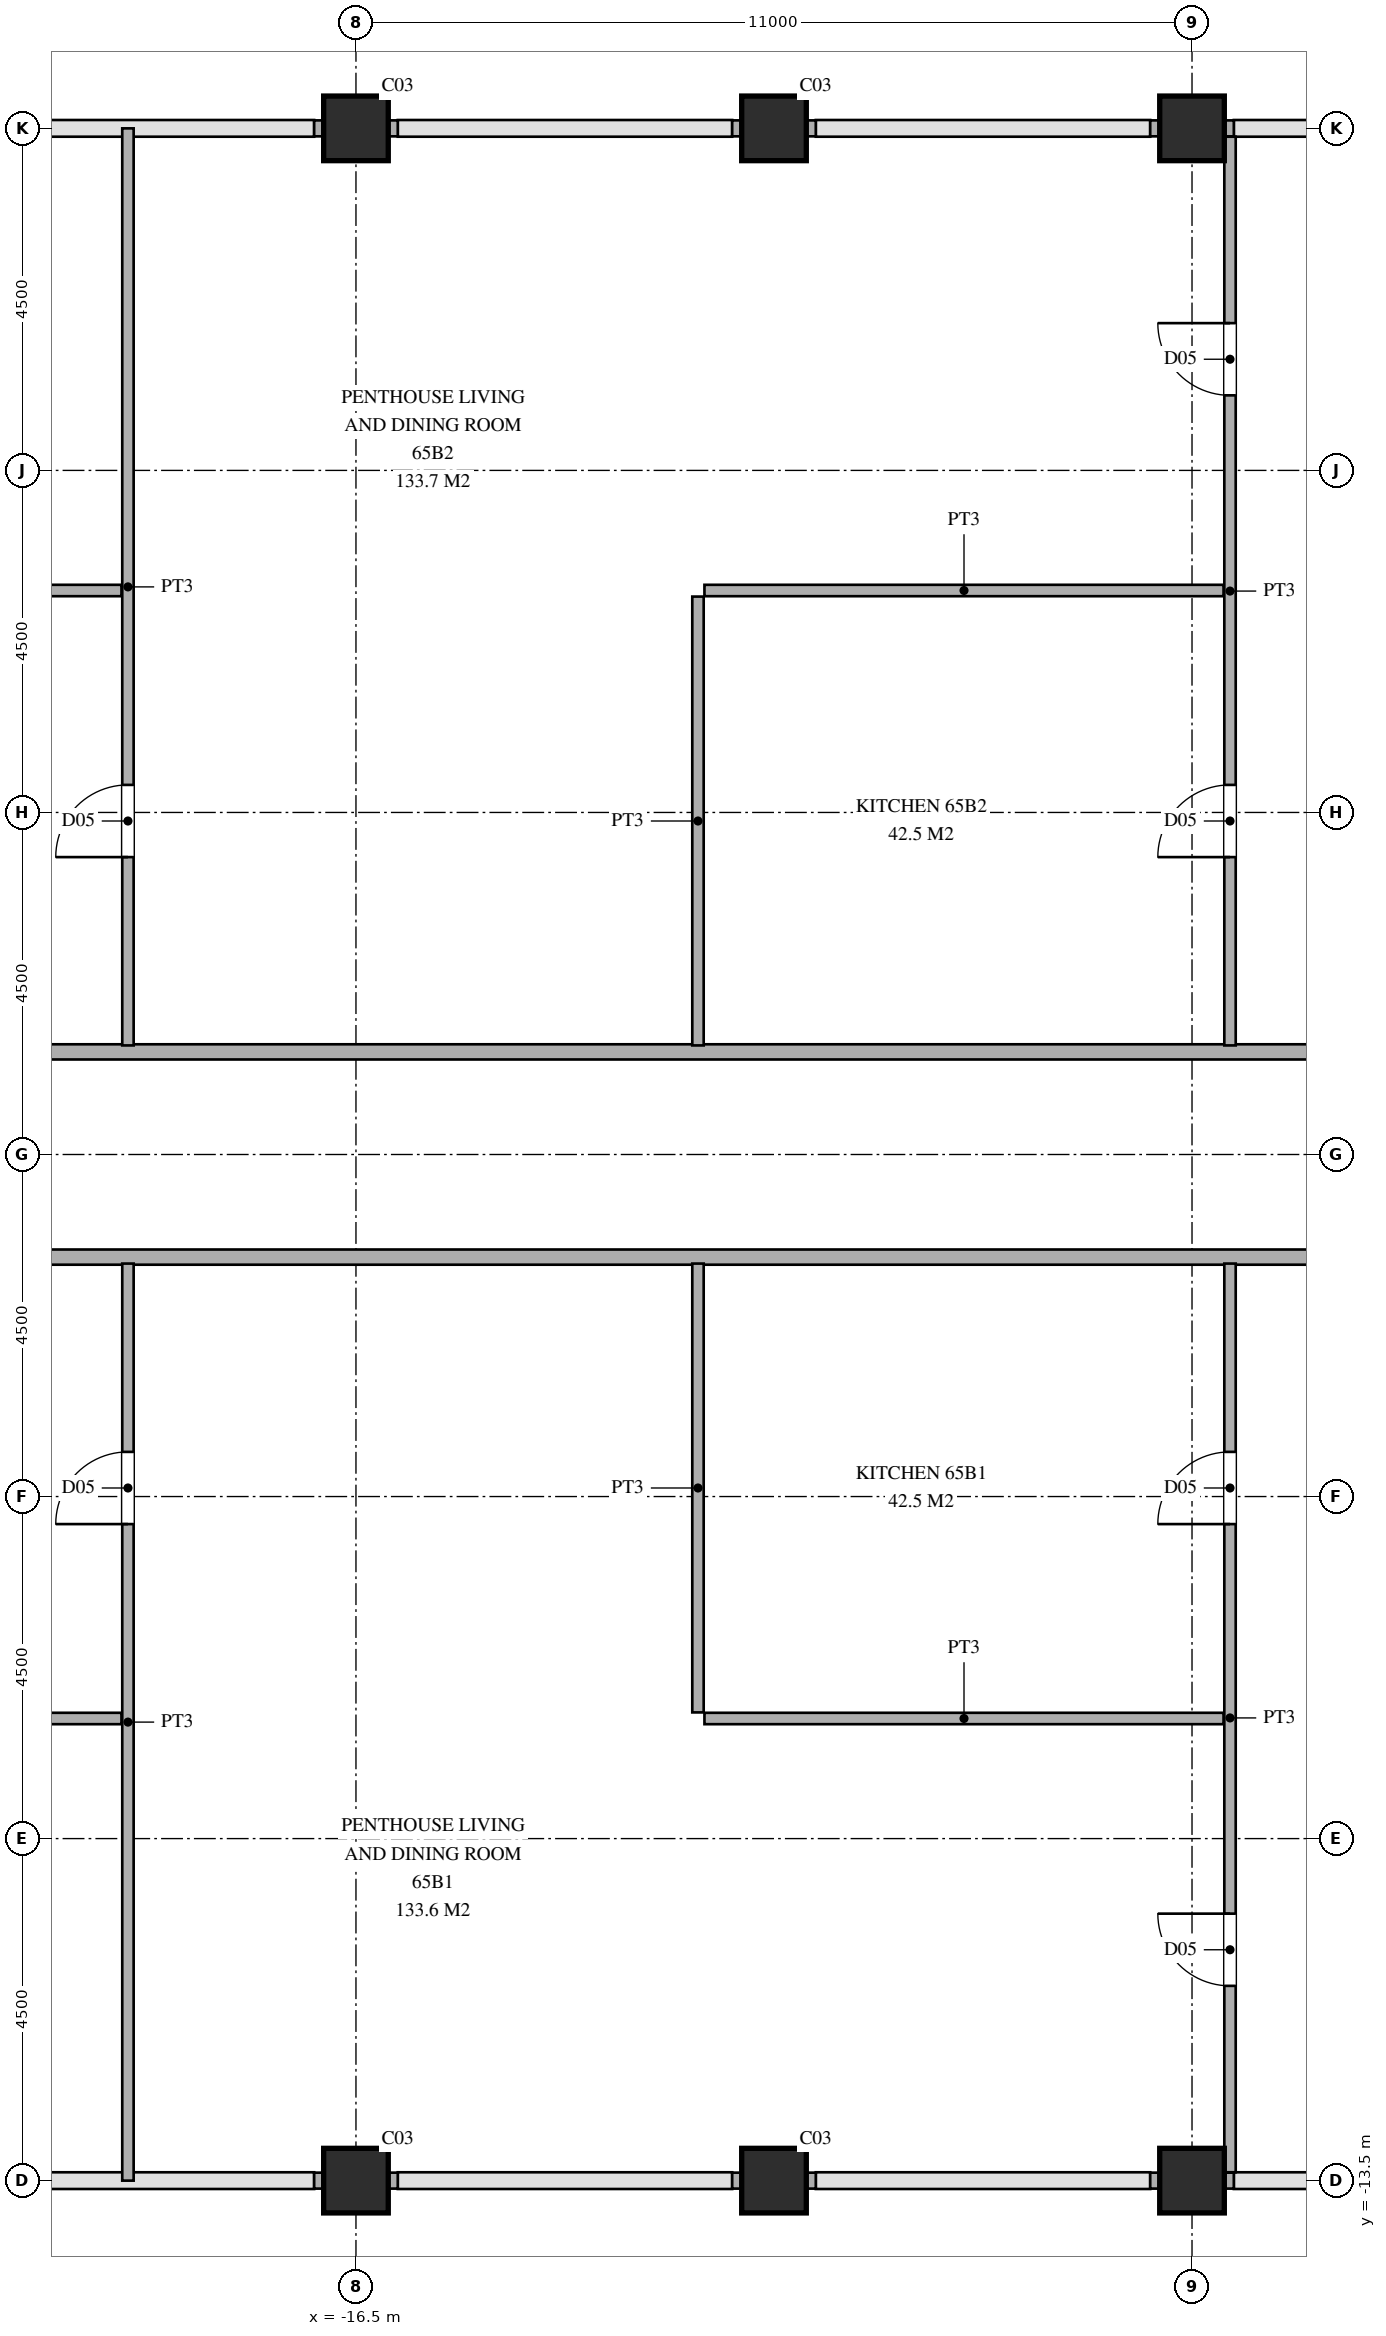
"""IFC4 building model, lengths in metres.
Left out: names, types, materials, properties, quantities, classifications, styles, units other than length and angle.
Written with IfcOpenShell. Run it as: python <this file> out.ifc"""

import sys

from ifc_helpers import new_model, si_unit, direction, frame, frame_2d, origin, origin_2d, place, context, subcontext, project, spatial, rectangle, hollow_rectangle, extrude, source, transform, mapped, element, fill, save


model = new_model("IFC4")
c1 = context("Model", 3, precision=1e-05, world=origin(), true_north=direction((0.0, 1.0)))
c2 = subcontext(c1, "Body", "Model", "MODEL_VIEW")
j1 = project(units=[si_unit("LENGTHUNIT", "METRE"), si_unit("PLANEANGLEUNIT", "RADIAN")], contexts=[c1])
p1 = place(None, origin())
s1 = spatial("IfcSite", under=j1, at=p1, CompositionType="ELEMENT")
p2 = place(p1, origin())
s2 = spatial("IfcBuilding", under=s1, at=p2, CompositionType="ELEMENT")
p3 = place(p2, frame((0.0, 0.0, 246.9)))
s3 = spatial("IfcBuildingStorey", under=s2, at=p3, CompositionType="ELEMENT", Elevation=246.9)
m1 = source(origin(), c2, "Body", "SweptSolid", [
    extrude(hollow_rectangle(XDim=0.85, YDim=0.85, WallThickness=0.036, at=origin_2d()), origin(), (0.0, 0.0, 1.0), 3.75),
])
for number, where, z_axis, x_axis in (
    (1, (-16.5, -13.5, 0.0), (0.0, 0.0, 1.0), (1.0, 0.0, 0.0)),
    (2, (-16.5, 13.5, 0.0), (0.0, 0.0, 1.0), (1.0, 0.0, 0.0)),
    (3, (-11.0, -13.5, 0.0), (0.0, 0.0, 1.0), (1.0, 0.0, 0.0)),
    (4, (-11.0, 13.5, 0.0), (0.0, 0.0, 1.0), (1.0, 0.0, 0.0)),
    (5, (-5.5, -13.5, 0.0), (0.0, 0.0, 1.0), (1.0, 0.0, 0.0)),
    (6, (-5.5, 13.5, 0.0), (0.0, 0.0, 1.0), (1.0, 0.0, 0.0)),
):
    element("IfcColumn", number, at=place(p3, frame(where, z_axis=z_axis, x_axis=x_axis)), inside=s3, PredefinedType="COLUMN", context=c2, shape_type="MappedRepresentation", body=[
        mapped(m1, transform((0.0, 0.0, 0.0), scale=1.0)),
    ])
for number, where, z_axis, x_axis in (
    (7, (-17.05, -13.5, 0.0), (0.0, 0.0, 1.0), (1.0, 0.0, 0.0)),
    (8, (-17.05, 13.5, 0.0), (0.0, 0.0, 1.0), (1.0, 0.0, 0.0)),
    (9, (-11.55, -13.5, 0.0), (0.0, 0.0, 1.0), (1.0, 0.0, 0.0)),
    (10, (-11.55, 13.5, 0.0), (0.0, 0.0, 1.0), (1.0, 0.0, 0.0)),
    (11, (-6.05, -13.5, 0.0), (0.0, 0.0, 1.0), (1.0, 0.0, 0.0)),
    (12, (-6.05, 13.5, 0.0), (0.0, 0.0, 1.0), (1.0, 0.0, 0.0)),
):
    element("IfcWall", number, at=place(p3, frame(where, z_axis=z_axis, x_axis=x_axis)), inside=s3, PredefinedType="SOLIDWALL", context=c2, shape_type="SweptSolid", body=[
        extrude(rectangle(XDim=1.1, YDim=0.21, at=frame_2d((0.55, 0.0))), origin(), (0.0, 0.0, 1.0), 3.03),
    ])
p4 = place(p3, frame((-27.245, -7.42, 0.0), z_axis=(0.0, 0.0, 1.0), x_axis=(1.0, 0.0, 0.0)))
e13 = element("IfcWall", 13, at=p4, inside=s3, PredefinedType="PARTITIONING", context=c2, shape_type="SweptSolid", body=[
    extrude(rectangle(XDim=7.66, YDim=0.15, at=frame_2d((3.83, 0.0))), origin(), (0.0, 0.0, 1.0), 3.53),
])
p5 = place(p4, frame((3.57, 0.0, 0.0)))
e14 = element("IfcOpeningElement", 14, at=p5, cuts=e13, PredefinedType="OPENING", context=c2, shape_type="SweptSolid", body=[
    extrude(rectangle(XDim=0.95, YDim=2.15, at=frame_2d((0.475, 1.075))), frame((0.0, 0.085, 0.0), z_axis=(0.0, -1.0, 0.0), x_axis=(1.0, 0.0, 0.0)), (0.0, 0.0, 1.0), 0.17),
])
p6 = place(p3, frame((-11.915, -7.42, 0.0), z_axis=(0.0, 0.0, 1.0), x_axis=(1.0, 0.0, 0.0)))
e15 = element("IfcWall", 15, at=p6, inside=s3, PredefinedType="PARTITIONING", context=c2, shape_type="SweptSolid", body=[
    extrude(rectangle(XDim=6.83, YDim=0.15, at=frame_2d((3.415, 0.0))), origin(), (0.0, 0.0, 1.0), 3.53),
])
p7 = place(p3, frame((-27.245, -1.35, 0.0), z_axis=(0.0, 0.0, 1.0), x_axis=(1.0, 0.0, 0.0)))
e16 = element("IfcWall", 16, at=p7, inside=s3, PredefinedType="PARTITIONING", context=c2, shape_type="SweptSolid", body=[
    extrude(rectangle(XDim=54.49, YDim=0.2, at=frame_2d((27.245, 0.0))), origin(), (0.0, 0.0, 1.0), 3.53),
])
p8 = place(p7, frame((24.97, 0.0, 0.0)))
e17 = element("IfcOpeningElement", 17, at=p8, cuts=e16, PredefinedType="OPENING", context=c2, shape_type="SweptSolid", body=[
    extrude(rectangle(XDim=1.05, YDim=2.25, at=frame_2d((0.525, 1.125))), frame((0.0, 0.11, 0.0), z_axis=(0.0, -1.0, 0.0), x_axis=(1.0, 0.0, 0.0)), (0.0, 0.0, 1.0), 0.22),
])
p9 = place(p3, frame((-27.245, 1.35, 0.0), z_axis=(0.0, 0.0, 1.0), x_axis=(1.0, 0.0, 0.0)))
e18 = element("IfcWall", 18, at=p9, inside=s3, PredefinedType="PARTITIONING", context=c2, shape_type="SweptSolid", body=[
    extrude(rectangle(XDim=54.49, YDim=0.2, at=frame_2d((27.245, 0.0))), origin(), (0.0, 0.0, 1.0), 3.53),
])
p10 = place(p9, frame((24.97, 0.0, 0.0)))
e19 = element("IfcOpeningElement", 19, at=p10, cuts=e18, PredefinedType="OPENING", context=c2, shape_type="SweptSolid", body=[
    extrude(rectangle(XDim=1.05, YDim=2.25, at=frame_2d((0.525, 1.125))), frame((0.0, 0.11, 0.0), z_axis=(0.0, -1.0, 0.0), x_axis=(1.0, 0.0, 0.0)), (0.0, 0.0, 1.0), 0.22),
])
p11 = place(p3, frame((-27.245, 7.42, 0.0), z_axis=(0.0, 0.0, 1.0), x_axis=(1.0, 0.0, 0.0)))
e20 = element("IfcWall", 20, at=p11, inside=s3, PredefinedType="PARTITIONING", context=c2, shape_type="SweptSolid", body=[
    extrude(rectangle(XDim=7.66, YDim=0.15, at=frame_2d((3.83, 0.0))), origin(), (0.0, 0.0, 1.0), 3.53),
])
p12 = place(p11, frame((3.57, 0.0, 0.0)))
e21 = element("IfcOpeningElement", 21, at=p12, cuts=e20, PredefinedType="OPENING", context=c2, shape_type="SweptSolid", body=[
    extrude(rectangle(XDim=0.95, YDim=2.15, at=frame_2d((0.475, 1.075))), frame((0.0, 0.085, 0.0), z_axis=(0.0, -1.0, 0.0), x_axis=(1.0, 0.0, 0.0)), (0.0, 0.0, 1.0), 0.17),
])
p13 = place(p3, frame((-11.915, 7.42, 0.0), z_axis=(0.0, 0.0, 1.0), x_axis=(1.0, 0.0, 0.0)))
e22 = element("IfcWall", 22, at=p13, inside=s3, PredefinedType="PARTITIONING", context=c2, shape_type="SweptSolid", body=[
    extrude(rectangle(XDim=6.83, YDim=0.15, at=frame_2d((3.415, 0.0))), origin(), (0.0, 0.0, 1.0), 3.53),
])
p14 = place(p3, frame((-19.5, -13.5, 0.0), z_axis=(0.0, 0.0, 1.0), x_axis=(0.0, 1.0, 0.0)))
e23 = element("IfcWall", 23, at=p14, inside=s3, PredefinedType="PARTITIONING", context=c2, shape_type="SweptSolid", body=[
    extrude(rectangle(XDim=12.065, YDim=0.15, at=frame_2d((6.032, 0.0))), origin(), (0.0, 0.0, 1.0), 3.53),
])
p15 = place(p14, frame((8.637, 0.0, 0.0)))
e24 = element("IfcOpeningElement", 24, at=p15, cuts=e23, PredefinedType="OPENING", context=c2, shape_type="SweptSolid", body=[
    extrude(rectangle(XDim=0.95, YDim=2.15, at=frame_2d((0.475, 1.075))), frame((0.0, 0.085, 0.0), z_axis=(0.0, -1.0, 0.0), x_axis=(1.0, 0.0, 0.0)), (0.0, 0.0, 1.0), 0.17),
])
p16 = place(p3, frame((-19.5, 1.435, 0.0), z_axis=(0.0, 0.0, 1.0), x_axis=(0.0, 1.0, 0.0)))
e25 = element("IfcWall", 25, at=p16, inside=s3, PredefinedType="PARTITIONING", context=c2, shape_type="SweptSolid", body=[
    extrude(rectangle(XDim=12.065, YDim=0.15, at=frame_2d((6.032, 0.0))), origin(), (0.0, 0.0, 1.0), 3.53),
])
p17 = place(p16, frame((2.478, 0.0, 0.0)))
e26 = element("IfcOpeningElement", 26, at=p17, cuts=e25, PredefinedType="OPENING", context=c2, shape_type="SweptSolid", body=[
    extrude(rectangle(XDim=0.95, YDim=2.15, at=frame_2d((0.475, 1.075))), frame((0.0, 0.085, 0.0), z_axis=(0.0, -1.0, 0.0), x_axis=(1.0, 0.0, 0.0)), (0.0, 0.0, 1.0), 0.17),
])
for number, where, z_axis, x_axis in (
    (27, (-12.0, -7.34, 0.0), (0.0, 0.0, 1.0), (0.0, 1.0, 0.0)),
    (28, (-12.0, 1.435, 0.0), (0.0, 0.0, 1.0), (0.0, 1.0, 0.0)),
):
    element("IfcWall", number, at=place(p3, frame(where, z_axis=z_axis, x_axis=x_axis)), inside=s3, PredefinedType="PARTITIONING", context=c2, shape_type="SweptSolid", body=[
        extrude(rectangle(XDim=5.905, YDim=0.15, at=frame_2d((2.953, 0.0))), origin(), (0.0, 0.0, 1.0), 3.53),
    ])
p18 = place(p3, frame((-5.0, -13.39, 0.0), z_axis=(0.0, 0.0, 1.0), x_axis=(0.0, 1.0, 0.0)))
e29 = element("IfcWall", 29, at=p18, inside=s3, PredefinedType="PARTITIONING", context=c2, shape_type="SweptSolid", body=[
    extrude(rectangle(XDim=11.955, YDim=0.15, at=frame_2d((5.978, 0.0))), origin(), (0.0, 0.0, 1.0), 3.53),
])
p19 = place(p18, frame((8.528, 0.0, 0.0)))
e30 = element("IfcOpeningElement", 30, at=p19, cuts=e29, PredefinedType="OPENING", context=c2, shape_type="SweptSolid", body=[
    extrude(rectangle(XDim=0.95, YDim=2.15, at=frame_2d((0.475, 1.075))), frame((0.0, 0.085, 0.0), z_axis=(0.0, -1.0, 0.0), x_axis=(1.0, 0.0, 0.0)), (0.0, 0.0, 1.0), 0.17),
])
p20 = place(p18, frame((2.452, 0.0, 0.0)))
e31 = element("IfcOpeningElement", 31, at=p20, cuts=e29, PredefinedType="OPENING", context=c2, shape_type="SweptSolid", body=[
    extrude(rectangle(XDim=0.95, YDim=2.15, at=frame_2d((0.475, 1.075))), frame((0.0, 0.085, 0.0), z_axis=(0.0, -1.0, 0.0), x_axis=(1.0, 0.0, 0.0)), (0.0, 0.0, 1.0), 0.17),
])
p21 = place(p3, frame((-5.0, 1.435, 0.0), z_axis=(0.0, 0.0, 1.0), x_axis=(0.0, 1.0, 0.0)))
e32 = element("IfcWall", 32, at=p21, inside=s3, PredefinedType="PARTITIONING", context=c2, shape_type="SweptSolid", body=[
    extrude(rectangle(XDim=11.955, YDim=0.15, at=frame_2d((5.978, 0.0))), origin(), (0.0, 0.0, 1.0), 3.53),
])
p22 = place(p21, frame((2.478, 0.0, 0.0)))
e33 = element("IfcOpeningElement", 33, at=p22, cuts=e32, PredefinedType="OPENING", context=c2, shape_type="SweptSolid", body=[
    extrude(rectangle(XDim=0.95, YDim=2.15, at=frame_2d((0.475, 1.075))), frame((0.0, 0.085, 0.0), z_axis=(0.0, -1.0, 0.0), x_axis=(1.0, 0.0, 0.0)), (0.0, 0.0, 1.0), 0.17),
])
p23 = place(p21, frame((8.552, 0.0, 0.0)))
e34 = element("IfcOpeningElement", 34, at=p23, cuts=e32, PredefinedType="OPENING", context=c2, shape_type="SweptSolid", body=[
    extrude(rectangle(XDim=0.95, YDim=2.15, at=frame_2d((0.475, 1.075))), frame((0.0, 0.085, 0.0), z_axis=(0.0, -1.0, 0.0), x_axis=(1.0, 0.0, 0.0)), (0.0, 0.0, 1.0), 0.17),
])
m2 = source(origin(), c2, "Body", "SweptSolid", [
    extrude(rectangle(XDim=0.95, YDim=2.15, at=frame_2d((0.475, 1.075))), frame((0.0, 0.025, 0.0), z_axis=(0.0, -1.0, 0.0), x_axis=(1.0, 0.0, 0.0)), (0.0, 0.0, 1.0), 0.05),
])
p24 = place(p15, origin())
e35 = element("IfcDoor", 35, at=p24, inside=s3, OperationType="SINGLE_SWING_LEFT", PredefinedType="DOOR", context=c2, shape_type="MappedRepresentation", body=[
    mapped(m2, transform((0.0, 0.0, 0.0), scale=1.0)),
])
fill(e24, e35)
p25 = place(p17, origin())
e36 = element("IfcDoor", 36, at=p25, inside=s3, OperationType="SINGLE_SWING_LEFT", PredefinedType="DOOR", context=c2, shape_type="MappedRepresentation", body=[
    mapped(m2, transform((0.0, 0.0, 0.0), scale=1.0)),
])
fill(e26, e36)
p26 = place(p19, origin())
e37 = element("IfcDoor", 37, at=p26, inside=s3, OperationType="SINGLE_SWING_LEFT", PredefinedType="DOOR", context=c2, shape_type="MappedRepresentation", body=[
    mapped(m2, transform((0.0, 0.0, 0.0), scale=1.0)),
])
fill(e30, e37)
p27 = place(p20, origin())
e38 = element("IfcDoor", 38, at=p27, inside=s3, OperationType="SINGLE_SWING_RIGHT", PredefinedType="DOOR", context=c2, shape_type="MappedRepresentation", body=[
    mapped(m2, transform((0.0, 0.0, 0.0), scale=1.0)),
])
fill(e31, e38)
p28 = place(p22, origin())
e39 = element("IfcDoor", 39, at=p28, inside=s3, OperationType="SINGLE_SWING_LEFT", PredefinedType="DOOR", context=c2, shape_type="MappedRepresentation", body=[
    mapped(m2, transform((0.0, 0.0, 0.0), scale=1.0)),
])
fill(e33, e39)
p29 = place(p23, origin())
e40 = element("IfcDoor", 40, at=p29, inside=s3, OperationType="SINGLE_SWING_RIGHT", PredefinedType="DOOR", context=c2, shape_type="MappedRepresentation", body=[
    mapped(m2, transform((0.0, 0.0, 0.0), scale=1.0)),
])
fill(e34, e40)
save(model, sys.argv[1])
